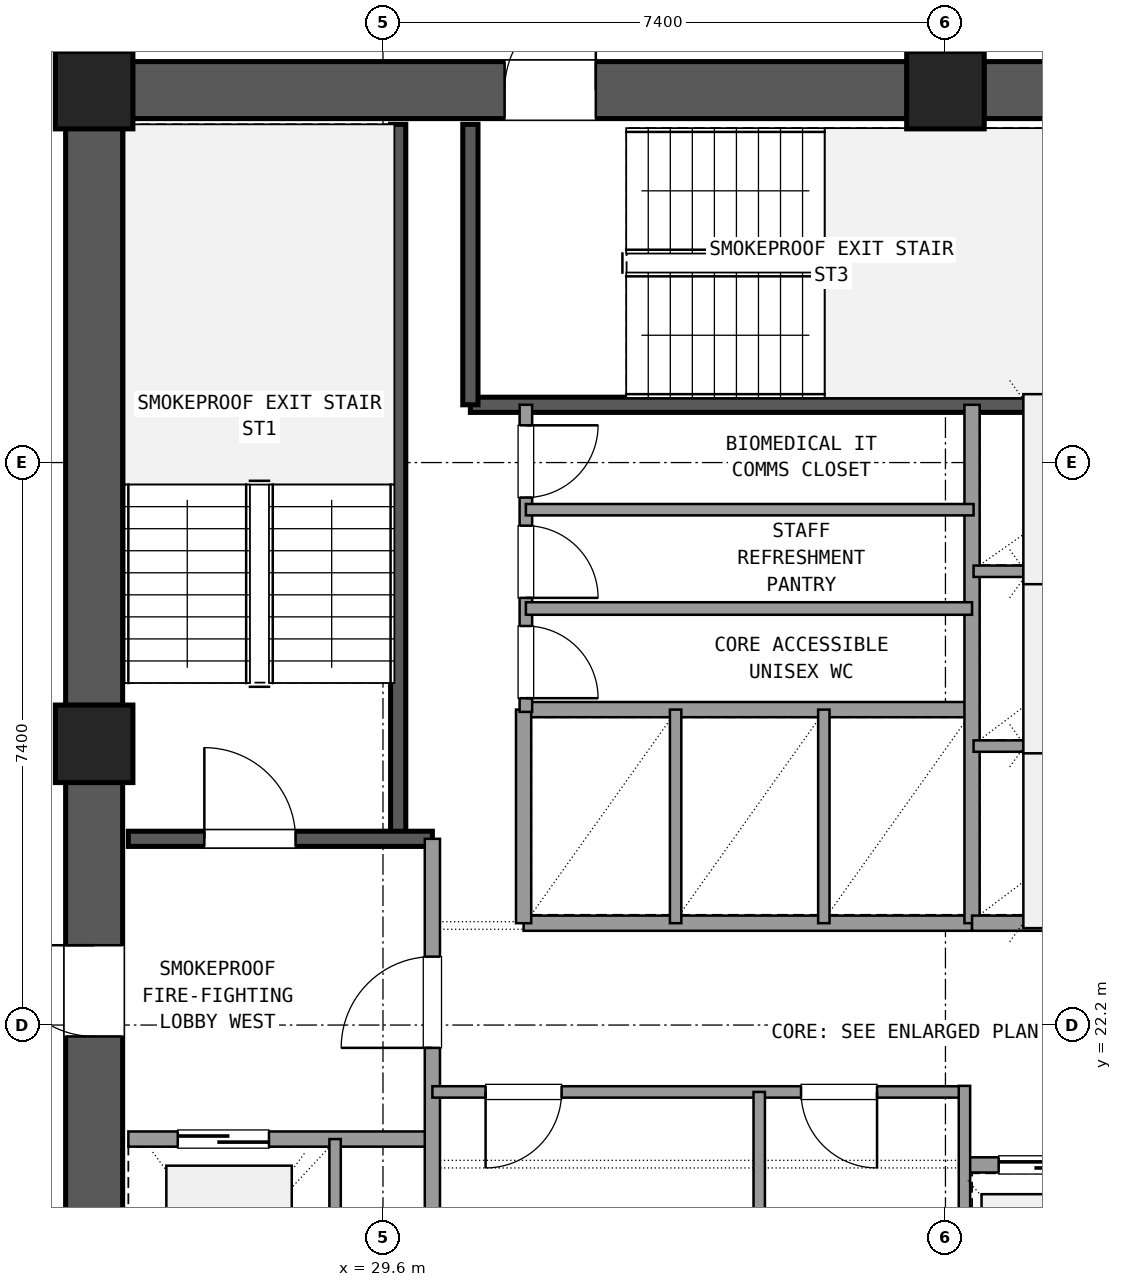
"""IFC4 building model, lengths in metres.
Left out: names, types, materials, properties, quantities, classifications, styles, units other than length and angle.
Written with IfcOpenShell. Run it as: python <this file> out.ifc"""

import sys

from ifc_helpers import new_model, si_unit, direction, frame, frame_2d, origin, origin_2d, place, context, subcontext, project, spatial, rectangle, extrude, element, fill, save


model = new_model("IFC4")
c1 = context("Model", 3, precision=1e-05, world=origin(), true_north=direction((0.0, 1.0)))
c2 = subcontext(c1, "Body", "Model", "MODEL_VIEW")
j1 = project(units=[si_unit("LENGTHUNIT", "METRE"), si_unit("PLANEANGLEUNIT", "RADIAN")], contexts=[c1])
p1 = place(None, origin())
s1 = spatial("IfcSite", under=j1, at=p1, CompositionType="ELEMENT")
p2 = place(p1, origin())
s2 = spatial("IfcBuilding", under=s1, at=p2, CompositionType="ELEMENT")
p3 = place(p2, frame((0.0, 0.0, 170.82)))
s3 = spatial("IfcBuildingStorey", under=s2, at=p3, CompositionType="ELEMENT", Elevation=170.82)
for number, where, z_axis, x_axis in (
    (1, (37.0, 34.5, 0.0), (0.0, 0.0, 1.0), (1.0, 0.0, 0.0)),
    (2, (25.8, 34.5, 0.0), (0.0, 0.0, 1.0), (1.0, 0.0, 0.0)),
    (3, (25.8, 25.9, 0.0), (0.0, 0.0, 1.0), (1.0, 0.0, 0.0)),
):
    element("IfcColumn", number, at=place(p3, frame(where, z_axis=z_axis, x_axis=x_axis)), inside=s3, PredefinedType="COLUMN", context=c2, shape_type="SweptSolid", body=[
        extrude(rectangle(XDim=1.02, YDim=1.02, at=origin_2d()), origin(), (0.0, 0.0, 1.0), 3.6),
    ])
p4 = place(p3, frame((47.695, 34.5, 0.0), z_axis=(0.0, 0.0, 1.0), x_axis=(-1.0, 0.0, 0.0)))
e4 = element("IfcWall", 4, at=p4, inside=s3, PredefinedType="SHEAR", context=c2, shape_type="SweptSolid", body=[
    extrude(rectangle(XDim=10.19, YDim=0.75, at=frame_2d((5.095, 0.0))), origin(), (0.0, 0.0, 1.0), 3.32),
])
p5 = place(p4, frame((4.595, 0.0, 0.0)))
e5 = element("IfcOpeningElement", 5, at=p5, cuts=e4, PredefinedType="OPENING", context=c2, shape_type="SweptSolid", body=[
    extrude(rectangle(XDim=1.6, YDim=2.2, at=frame_2d((0.8, 1.1))), frame((0.0, 0.385, 0.0), z_axis=(0.0, -1.0, 0.0), x_axis=(1.0, 0.0, 0.0)), (0.0, 0.0, 1.0), 0.77),
])
p6 = place(p3, frame((36.495, 34.5, 0.0), z_axis=(0.0, 0.0, 1.0), x_axis=(-1.0, 0.0, 0.0)))
e6 = element("IfcWall", 6, at=p6, inside=s3, PredefinedType="SHEAR", context=c2, shape_type="SweptSolid", body=[
    extrude(rectangle(XDim=10.19, YDim=0.75, at=frame_2d((5.095, 0.0))), origin(), (0.0, 0.0, 1.0), 3.32),
])
p7 = place(p6, frame((4.095, 0.0, 0.0)))
e7 = element("IfcOpeningElement", 7, at=p7, cuts=e6, PredefinedType="OPENING", context=c2, shape_type="SweptSolid", body=[
    extrude(rectangle(XDim=1.2, YDim=2.15, at=frame_2d((0.6, 1.075))), frame((0.0, 0.385, 0.0), z_axis=(0.0, -1.0, 0.0), x_axis=(1.0, 0.0, 0.0)), (0.0, 0.0, 1.0), 0.77),
])
p8 = place(p3, frame((25.8, 33.995, 0.0), z_axis=(0.0, 0.0, 1.0), x_axis=(0.0, -1.0, 0.0)))
e8 = element("IfcWall", 8, at=p8, inside=s3, PredefinedType="SHEAR", context=c2, shape_type="SweptSolid", body=[
    extrude(rectangle(XDim=7.59, YDim=0.75, at=frame_2d((3.795, 0.0))), origin(), (0.0, 0.0, 1.0), 3.32),
])
p9 = place(p3, frame((25.8, 25.395, 0.0), z_axis=(0.0, 0.0, 1.0), x_axis=(0.0, -1.0, 0.0)))
e9 = element("IfcWall", 9, at=p9, inside=s3, PredefinedType="SHEAR", context=c2, shape_type="SweptSolid", body=[
    extrude(rectangle(XDim=7.59, YDim=0.75, at=frame_2d((3.795, 0.0))), origin(), (0.0, 0.0, 1.0), 3.32),
])
p10 = place(p9, frame((2.145, 0.0, 0.0)))
e10 = element("IfcOpeningElement", 10, at=p10, cuts=e9, PredefinedType="OPENING", context=c2, shape_type="SweptSolid", body=[
    extrude(rectangle(XDim=1.2, YDim=2.15, at=frame_2d((0.6, 1.075))), frame((0.0, 0.385, 0.0), z_axis=(0.0, -1.0, 0.0), x_axis=(1.0, 0.0, 0.0)), (0.0, 0.0, 1.0), 0.77),
])
p11 = place(p3, frame((29.8, 24.65, 0.0), z_axis=(0.0, 0.0, 1.0), x_axis=(0.0, 1.0, 0.0)))
e11 = element("IfcWall", 11, at=p11, inside=s3, PredefinedType="SHEAR", context=c2, shape_type="SweptSolid", body=[
    extrude(rectangle(XDim=9.4, YDim=0.2, at=frame_2d((4.7, 0.0))), origin(), (0.0, 0.0, 1.0), 3.32),
])
p12 = place(p3, frame((26.25, 24.65, 0.0), z_axis=(0.0, 0.0, 1.0), x_axis=(1.0, 0.0, 0.0)))
e12 = element("IfcWall", 12, at=p12, inside=s3, PredefinedType="SHEAR", context=c2, shape_type="SweptSolid", body=[
    extrude(rectangle(XDim=4.0, YDim=0.2, at=frame_2d((2.0, 0.0))), origin(), (0.0, 0.0, 1.0), 3.32),
])
p13 = place(p12, frame((1.0, 0.0, 0.0)))
e13 = element("IfcOpeningElement", 13, at=p13, cuts=e12, PredefinedType="OPENING", context=c2, shape_type="SweptSolid", body=[
    extrude(rectangle(XDim=1.2, YDim=2.15, at=frame_2d((0.6, 1.075))), frame((0.0, 0.11, 0.0), z_axis=(0.0, -1.0, 0.0), x_axis=(1.0, 0.0, 0.0)), (0.0, 0.0, 1.0), 0.22),
])
p14 = place(p3, frame((30.75, 30.36, 0.0), z_axis=(0.0, 0.0, 1.0), x_axis=(1.0, 0.0, 0.0)))
e14 = element("IfcWall", 14, at=p14, inside=s3, PredefinedType="SHEAR", context=c2, shape_type="SweptSolid", body=[
    extrude(rectangle(XDim=9.5, YDim=0.2, at=frame_2d((4.75, 0.0))), origin(), (0.0, 0.0, 1.0), 3.32),
])
p15 = place(p3, frame((30.75, 30.36, 0.0), z_axis=(0.0, 0.0, 1.0), x_axis=(0.0, 1.0, 0.0)))
e15 = element("IfcWall", 15, at=p15, inside=s3, PredefinedType="SHEAR", context=c2, shape_type="SweptSolid", body=[
    extrude(rectangle(XDim=3.69, YDim=0.2, at=frame_2d((1.845, 0.0))), origin(), (0.0, 0.0, 1.0), 3.32),
])
p16 = place(p3, frame((26.25, 20.7, 0.0), z_axis=(0.0, 0.0, 1.0), x_axis=(1.0, 0.0, 0.0)))
e16 = element("IfcWall", 16, at=p16, inside=s3, PredefinedType="SOLIDWALL", context=c2, shape_type="SweptSolid", body=[
    extrude(rectangle(XDim=4.0, YDim=0.2, at=frame_2d((2.0, 0.0))), origin(), (0.0, 0.0, 1.0), 2.61),
])
p17 = place(p16, frame((0.65, 0.0, 0.0)))
e17 = element("IfcOpeningElement", 17, at=p17, cuts=e16, PredefinedType="OPENING", context=c2, shape_type="SweptSolid", body=[
    extrude(rectangle(XDim=1.2, YDim=2.15, at=frame_2d((0.6, 1.075))), frame((0.0, 0.11, 0.0), z_axis=(0.0, -1.0, 0.0), x_axis=(1.0, 0.0, 0.0)), (0.0, 0.0, 1.0), 0.22),
])
p18 = place(p3, frame((30.25, 17.75, 0.0), z_axis=(0.0, 0.0, 1.0), x_axis=(0.0, 1.0, 0.0)))
e18 = element("IfcWall", 18, at=p18, inside=s3, PredefinedType="SOLIDWALL", context=c2, shape_type="SweptSolid", body=[
    extrude(rectangle(XDim=6.9, YDim=0.2, at=frame_2d((3.45, 0.0))), origin(), (0.0, 0.0, 1.0), 2.61),
])
p19 = place(p18, frame((4.15, 0.0, 0.0)))
e19 = element("IfcOpeningElement", 19, at=p19, cuts=e18, PredefinedType="OPENING", context=c2, shape_type="SweptSolid", body=[
    extrude(rectangle(XDim=1.2, YDim=2.15, at=frame_2d((0.6, 1.075))), frame((0.0, 0.11, 0.0), z_axis=(0.0, -1.0, 0.0), x_axis=(1.0, 0.0, 0.0)), (0.0, 0.0, 1.0), 0.22),
])
p20 = place(p3, frame((28.97, 17.75, 0.0), z_axis=(0.0, 0.0, 1.0), x_axis=(0.0, 1.0, 0.0)))
e20 = element("IfcWall", 20, at=p20, inside=s3, PredefinedType="PARTITIONING", context=c2, shape_type="SweptSolid", body=[
    extrude(rectangle(XDim=2.95, YDim=0.15, at=frame_2d((1.475, 0.0))), origin(), (0.0, 0.0, 1.0), 2.61),
])
p21 = place(p3, frame((30.25, 21.32, 0.0), z_axis=(0.0, 0.0, 1.0), x_axis=(1.0, 0.0, 0.0)))
e21 = element("IfcWall", 21, at=p21, inside=s3, PredefinedType="PARTITIONING", context=c2, shape_type="SweptSolid", body=[
    extrude(rectangle(XDim=7.0, YDim=0.15, at=frame_2d((3.5, 0.0))), origin(), (0.0, 0.0, 1.0), 2.61),
])
p22 = place(p21, frame((0.7, 0.0, 0.0)))
e22 = element("IfcOpeningElement", 22, at=p22, cuts=e21, PredefinedType="OPENING", context=c2, shape_type="SweptSolid", body=[
    extrude(rectangle(XDim=1.0, YDim=2.15, at=frame_2d((0.5, 1.075))), frame((0.0, 0.085, 0.0), z_axis=(0.0, -1.0, 0.0), x_axis=(1.0, 0.0, 0.0)), (0.0, 0.0, 1.0), 0.17),
])
p23 = place(p21, frame((4.85, 0.0, 0.0)))
e23 = element("IfcOpeningElement", 23, at=p23, cuts=e21, PredefinedType="OPENING", context=c2, shape_type="SweptSolid", body=[
    extrude(rectangle(XDim=1.0, YDim=2.15, at=frame_2d((0.5, 1.075))), frame((0.0, 0.085, 0.0), z_axis=(0.0, -1.0, 0.0), x_axis=(1.0, 0.0, 0.0)), (0.0, 0.0, 1.0), 0.17),
])
p24 = place(p3, frame((34.55, 17.75, 0.0), z_axis=(0.0, 0.0, 1.0), x_axis=(0.0, 1.0, 0.0)))
e24 = element("IfcWall", 24, at=p24, inside=s3, PredefinedType="PARTITIONING", context=c2, shape_type="SweptSolid", body=[
    extrude(rectangle(XDim=3.57, YDim=0.15, at=frame_2d((1.785, 0.0))), origin(), (0.0, 0.0, 1.0), 2.61),
])
p25 = place(p3, frame((37.25, 20.36, 0.0), z_axis=(0.0, 0.0, 1.0), x_axis=(1.0, 0.0, 0.0)))
e25 = element("IfcWall", 25, at=p25, inside=s3, PredefinedType="SOLIDWALL", context=c2, shape_type="SweptSolid", body=[
    extrude(rectangle(XDim=6.1, YDim=0.2, at=frame_2d((3.05, 0.0))), origin(), (0.0, 0.0, 1.0), 2.61),
])
p26 = place(p25, frame((0.45, 0.0, 0.0)))
e26 = element("IfcOpeningElement", 26, at=p26, cuts=e25, PredefinedType="OPENING", context=c2, shape_type="SweptSolid", body=[
    extrude(rectangle(XDim=1.1, YDim=2.15, at=frame_2d((0.55, 1.075))), frame((0.0, 0.11, 0.0), z_axis=(0.0, -1.0, 0.0), x_axis=(1.0, 0.0, 0.0)), (0.0, 0.0, 1.0), 0.22),
])
p27 = place(p25, frame((2.5, 0.0, 0.0)))
e27 = element("IfcOpeningElement", 27, at=p27, cuts=e25, PredefinedType="OPENING", context=c2, shape_type="SweptSolid", body=[
    extrude(rectangle(XDim=1.1, YDim=2.15, at=frame_2d((0.55, 1.075))), frame((0.0, 0.11, 0.0), z_axis=(0.0, -1.0, 0.0), x_axis=(1.0, 0.0, 0.0)), (0.0, 0.0, 1.0), 0.22),
])
p28 = place(p25, frame((4.55, 0.0, 0.0)))
e28 = element("IfcOpeningElement", 28, at=p28, cuts=e25, PredefinedType="OPENING", context=c2, shape_type="SweptSolid", body=[
    extrude(rectangle(XDim=1.1, YDim=2.15, at=frame_2d((0.55, 1.075))), frame((0.0, 0.11, 0.0), z_axis=(0.0, -1.0, 0.0), x_axis=(1.0, 0.0, 0.0)), (0.0, 0.0, 1.0), 0.22),
])
p29 = place(p3, frame((37.25, 17.75, 0.0), z_axis=(0.0, 0.0, 1.0), x_axis=(0.0, 1.0, 0.0)))
e29 = element("IfcWall", 29, at=p29, inside=s3, PredefinedType="PARTITIONING", context=c2, shape_type="SweptSolid", body=[
    extrude(rectangle(XDim=3.65, YDim=0.15, at=frame_2d((1.825, 0.0))), origin(), (0.0, 0.0, 1.0), 2.61),
])
for number, where, z_axis, x_axis in (
    (30, (31.45, 23.54, 0.0), (0.0, 0.0, 1.0), (1.0, 0.0, 0.0)),
    (31, (31.45, 26.35, 0.0), (0.0, 0.0, 1.0), (1.0, 0.0, 0.0)),
):
    element("IfcWall", number, at=place(p3, frame(where, z_axis=z_axis, x_axis=x_axis)), inside=s3, PredefinedType="SOLIDWALL", context=c2, shape_type="SweptSolid", body=[
        extrude(rectangle(XDim=5.9, YDim=0.2, at=frame_2d((2.95, 0.0))), origin(), (0.0, 0.0, 1.0), 2.61),
    ])
p30 = place(p3, frame((31.45, 23.54, 0.0), z_axis=(0.0, 0.0, 1.0), x_axis=(0.0, 1.0, 0.0)))
e32 = element("IfcWall", 32, at=p30, inside=s3, PredefinedType="SOLIDWALL", context=c2, shape_type="SweptSolid", body=[
    extrude(rectangle(XDim=2.81, YDim=0.2, at=frame_2d((1.405, 0.0))), origin(), (0.0, 0.0, 1.0), 2.61),
])
for number, where, z_axis, x_axis in (
    (33, (33.45, 23.54, 0.0), (0.0, 0.0, 1.0), (0.0, 1.0, 0.0)),
    (34, (35.4, 23.54, 0.0), (0.0, 0.0, 1.0), (0.0, 1.0, 0.0)),
):
    element("IfcWall", number, at=place(p3, frame(where, z_axis=z_axis, x_axis=x_axis)), inside=s3, PredefinedType="PARTITIONING", context=c2, shape_type="SweptSolid", body=[
        extrude(rectangle(XDim=2.81, YDim=0.15, at=frame_2d((1.405, 0.0))), origin(), (0.0, 0.0, 1.0), 2.61),
    ])
p31 = place(p3, frame((37.35, 23.54, 0.0), z_axis=(0.0, 0.0, 1.0), x_axis=(0.0, 1.0, 0.0)))
e35 = element("IfcWall", 35, at=p31, inside=s3, PredefinedType="SOLIDWALL", context=c2, shape_type="SweptSolid", body=[
    extrude(rectangle(XDim=6.82, YDim=0.2, at=frame_2d((3.41, 0.0))), origin(), (0.0, 0.0, 1.0), 2.61),
])
p32 = place(p3, frame((37.35, 23.54, 0.0), z_axis=(0.0, 0.0, 1.0), x_axis=(1.0, 0.0, 0.0)))
e36 = element("IfcWall", 36, at=p32, inside=s3, PredefinedType="SOLIDWALL", context=c2, shape_type="SweptSolid", body=[
    extrude(rectangle(XDim=3.05, YDim=0.2, at=frame_2d((1.525, 0.0))), origin(), (0.0, 0.0, 1.0), 2.61),
])
for number, where, z_axis, x_axis in (
    (37, (37.37, 25.87, 0.0), (0.0, 0.0, 1.0), (1.0, 0.0, 0.0)),
    (38, (37.37, 28.17, 0.0), (0.0, 0.0, 1.0), (1.0, 0.0, 0.0)),
):
    element("IfcWall", number, at=place(p3, frame(where, z_axis=z_axis, x_axis=x_axis)), inside=s3, PredefinedType="PARTITIONING", context=c2, shape_type="SweptSolid", body=[
        extrude(rectangle(XDim=3.01, YDim=0.15, at=frame_2d((1.505, 0.0))), origin(), (0.0, 0.0, 1.0), 2.61),
    ])
p33 = place(p3, frame((31.48, 26.32, 0.0), z_axis=(0.0, 0.0, 1.0), x_axis=(0.0, 1.0, 0.0)))
e39 = element("IfcWall", 39, at=p33, inside=s3, PredefinedType="PLUMBINGWALL", context=c2, shape_type="SweptSolid", body=[
    extrude(rectangle(XDim=4.04, YDim=0.165, at=frame_2d((2.02, 0.0))), origin(), (0.0, 0.0, 1.0), 2.61),
])
p34 = place(p33, frame((0.18, 0.0, 0.0)))
e40 = element("IfcOpeningElement", 40, at=p34, cuts=e39, PredefinedType="OPENING", context=c2, shape_type="SweptSolid", body=[
    extrude(rectangle(XDim=0.95, YDim=2.1, at=frame_2d((0.475, 1.05))), frame((0.0, 0.093, 0.0), z_axis=(0.0, -1.0, 0.0), x_axis=(1.0, 0.0, 0.0)), (0.0, 0.0, 1.0), 0.185),
])
p35 = place(p33, frame((1.5, 0.0, 0.0)))
e41 = element("IfcOpeningElement", 41, at=p35, cuts=e39, PredefinedType="OPENING", context=c2, shape_type="SweptSolid", body=[
    extrude(rectangle(XDim=0.95, YDim=2.1, at=frame_2d((0.475, 1.05))), frame((0.0, 0.093, 0.0), z_axis=(0.0, -1.0, 0.0), x_axis=(1.0, 0.0, 0.0)), (0.0, 0.0, 1.0), 0.185),
])
p36 = place(p33, frame((2.82, 0.0, 0.0)))
e42 = element("IfcOpeningElement", 42, at=p36, cuts=e39, PredefinedType="OPENING", context=c2, shape_type="SweptSolid", body=[
    extrude(rectangle(XDim=0.95, YDim=2.1, at=frame_2d((0.475, 1.05))), frame((0.0, 0.093, 0.0), z_axis=(0.0, -1.0, 0.0), x_axis=(1.0, 0.0, 0.0)), (0.0, 0.0, 1.0), 0.185),
])
p37 = place(p3, frame((31.48, 27.68, 0.0), z_axis=(0.0, 0.0, 1.0), x_axis=(1.0, 0.0, 0.0)))
e43 = element("IfcWall", 43, at=p37, inside=s3, PredefinedType="PLUMBINGWALL", context=c2, shape_type="SweptSolid", body=[
    extrude(rectangle(XDim=5.87, YDim=0.165, at=frame_2d((2.935, 0.0))), origin(), (0.0, 0.0, 1.0), 2.61),
])
p38 = place(p3, frame((31.48, 28.98, 0.0), z_axis=(0.0, 0.0, 1.0), x_axis=(1.0, 0.0, 0.0)))
e44 = element("IfcWall", 44, at=p38, inside=s3, PredefinedType="PARTITIONING", context=c2, shape_type="SweptSolid", body=[
    extrude(rectangle(XDim=5.89, YDim=0.15, at=frame_2d((2.945, 0.0))), origin(), (0.0, 0.0, 1.0), 2.61),
])
p39 = place(p3, frame((37.0, 34.95, 0.0), z_axis=(0.0, 0.0, 1.0), x_axis=(0.0, 1.0, 0.0)))
e45 = element("IfcWall", 45, at=p39, inside=s3, PredefinedType="PARTITIONING", context=c2, shape_type="SweptSolid", body=[
    extrude(rectangle(XDim=3.21, YDim=0.18, at=frame_2d((1.605, 0.0))), origin(), (0.0, 0.0, 1.0), 2.61),
])
p40 = place(p39, frame((0.605, 0.0, 0.0)))
e46 = element("IfcOpeningElement", 46, at=p40, cuts=e45, PredefinedType="OPENING", context=c2, shape_type="SweptSolid", body=[
    extrude(rectangle(XDim=2.0, YDim=2.2, at=frame_2d((1.0, 1.1))), frame((0.0, 0.1, 0.0), z_axis=(0.0, -1.0, 0.0), x_axis=(1.0, 0.0, 0.0)), (0.0, 0.0, 1.0), 0.2),
])
p41 = place(p13, origin())
e47 = element("IfcDoor", 47, at=p41, inside=s3, OperationType="SINGLE_SWING_LEFT", PredefinedType="DOOR", context=c2, shape_type="SweptSolid", body=[
    extrude(rectangle(XDim=1.2, YDim=2.15, at=frame_2d((0.6, 1.075))), frame((0.0, 0.025, 0.0), z_axis=(0.0, -1.0, 0.0), x_axis=(1.0, 0.0, 0.0)), (0.0, 0.0, 1.0), 0.05),
])
fill(e13, e47)
p42 = place(p17, origin())
e48 = element("IfcDoor", 48, at=p42, inside=s3, OperationType="SLIDING_TO_LEFT", PredefinedType="DOOR", context=c2, shape_type="SweptSolid", body=[
    extrude(rectangle(XDim=1.2, YDim=2.15, at=frame_2d((0.6, 1.075))), frame((0.0, 0.025, 0.0), z_axis=(0.0, -1.0, 0.0), x_axis=(1.0, 0.0, 0.0)), (0.0, 0.0, 1.0), 0.05),
])
fill(e17, e48)
p43 = place(p19, origin())
e49 = element("IfcDoor", 49, at=p43, inside=s3, OperationType="SINGLE_SWING_LEFT", PredefinedType="DOOR", context=c2, shape_type="SweptSolid", body=[
    extrude(rectangle(XDim=1.2, YDim=2.15, at=frame_2d((0.6, 1.075))), frame((0.0, 0.025, 0.0), z_axis=(0.0, -1.0, 0.0), x_axis=(1.0, 0.0, 0.0)), (0.0, 0.0, 1.0), 0.05),
])
fill(e19, e49)
p44 = place(p10, frame((1.2, 0.0, 0.0), z_axis=(0.0, 0.0, 1.0), x_axis=(-1.0, 0.0, 0.0)))
e50 = element("IfcDoor", 50, at=p44, inside=s3, OperationType="SINGLE_SWING_LEFT", PredefinedType="DOOR", context=c2, shape_type="SweptSolid", body=[
    extrude(rectangle(XDim=1.2, YDim=2.15, at=frame_2d((0.6, 1.075))), frame((0.0, 0.025, 0.0), z_axis=(0.0, -1.0, 0.0), x_axis=(1.0, 0.0, 0.0)), (0.0, 0.0, 1.0), 0.05),
])
fill(e10, e50)
p45 = place(p7, frame((1.2, 0.0, 0.0), z_axis=(0.0, 0.0, 1.0), x_axis=(-1.0, 0.0, 0.0)))
e51 = element("IfcDoor", 51, at=p45, inside=s3, OperationType="SINGLE_SWING_LEFT", PredefinedType="DOOR", context=c2, shape_type="SweptSolid", body=[
    extrude(rectangle(XDim=1.2, YDim=2.15, at=frame_2d((0.6, 1.075))), frame((0.0, 0.025, 0.0), z_axis=(0.0, -1.0, 0.0), x_axis=(1.0, 0.0, 0.0)), (0.0, 0.0, 1.0), 0.05),
])
fill(e7, e51)
p46 = place(p22, frame((1.0, 0.0, 0.0), z_axis=(0.0, 0.0, 1.0), x_axis=(-1.0, 0.0, 0.0)))
e52 = element("IfcDoor", 52, at=p46, inside=s3, OperationType="SINGLE_SWING_LEFT", PredefinedType="DOOR", context=c2, shape_type="SweptSolid", body=[
    extrude(rectangle(XDim=1.0, YDim=2.15, at=frame_2d((0.5, 1.075))), frame((0.0, 0.025, 0.0), z_axis=(0.0, -1.0, 0.0), x_axis=(1.0, 0.0, 0.0)), (0.0, 0.0, 1.0), 0.05),
])
fill(e22, e52)
p47 = place(p23, frame((1.0, 0.0, 0.0), z_axis=(0.0, 0.0, 1.0), x_axis=(-1.0, 0.0, 0.0)))
e53 = element("IfcDoor", 53, at=p47, inside=s3, OperationType="SINGLE_SWING_RIGHT", PredefinedType="DOOR", context=c2, shape_type="SweptSolid", body=[
    extrude(rectangle(XDim=1.0, YDim=2.15, at=frame_2d((0.5, 1.075))), frame((0.0, 0.025, 0.0), z_axis=(0.0, -1.0, 0.0), x_axis=(1.0, 0.0, 0.0)), (0.0, 0.0, 1.0), 0.05),
])
fill(e23, e53)
p48 = place(p26, origin())
e54 = element("IfcDoor", 54, at=p48, inside=s3, OperationType="SLIDING_TO_LEFT", PredefinedType="DOOR", context=c2, shape_type="SweptSolid", body=[
    extrude(rectangle(XDim=1.1, YDim=2.15, at=frame_2d((0.55, 1.075))), frame((0.0, 0.025, 0.0), z_axis=(0.0, -1.0, 0.0), x_axis=(1.0, 0.0, 0.0)), (0.0, 0.0, 1.0), 0.05),
])
fill(e26, e54)
p49 = place(p34, frame((0.95, 0.0, 0.0), z_axis=(0.0, 0.0, 1.0), x_axis=(-1.0, 0.0, 0.0)))
e55 = element("IfcDoor", 55, at=p49, inside=s3, OperationType="SINGLE_SWING_LEFT", PredefinedType="DOOR", context=c2, shape_type="SweptSolid", body=[
    extrude(rectangle(XDim=0.95, YDim=2.1, at=frame_2d((0.475, 1.05))), frame((0.0, 0.025, 0.0), z_axis=(0.0, -1.0, 0.0), x_axis=(1.0, 0.0, 0.0)), (0.0, 0.0, 1.0), 0.05),
])
fill(e40, e55)
p50 = place(p35, frame((0.95, 0.0, 0.0), z_axis=(0.0, 0.0, 1.0), x_axis=(-1.0, 0.0, 0.0)))
e56 = element("IfcDoor", 56, at=p50, inside=s3, OperationType="SINGLE_SWING_LEFT", PredefinedType="DOOR", context=c2, shape_type="SweptSolid", body=[
    extrude(rectangle(XDim=0.95, YDim=2.1, at=frame_2d((0.475, 1.05))), frame((0.0, 0.025, 0.0), z_axis=(0.0, -1.0, 0.0), x_axis=(1.0, 0.0, 0.0)), (0.0, 0.0, 1.0), 0.05),
])
fill(e41, e56)
p51 = place(p36, frame((0.95, 0.0, 0.0), z_axis=(0.0, 0.0, 1.0), x_axis=(-1.0, 0.0, 0.0)))
e57 = element("IfcDoor", 57, at=p51, inside=s3, OperationType="SINGLE_SWING_RIGHT", PredefinedType="DOOR", context=c2, shape_type="SweptSolid", body=[
    extrude(rectangle(XDim=0.95, YDim=2.1, at=frame_2d((0.475, 1.05))), frame((0.0, 0.025, 0.0), z_axis=(0.0, -1.0, 0.0), x_axis=(1.0, 0.0, 0.0)), (0.0, 0.0, 1.0), 0.05),
])
fill(e42, e57)
save(model, sys.argv[1])
